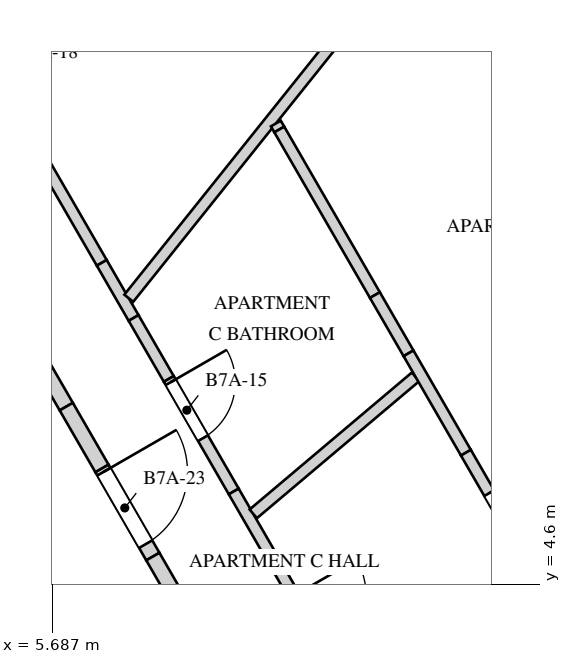
"""IFC4 building model, lengths in metres.
Left out: names, types, materials, properties, quantities, classifications, styles, units other than length and angle.
Written with IfcOpenShell. Run it as: python <this file> out.ifc"""

import sys

from ifc_helpers import new_model, si_unit, direction, frame, frame_2d, origin, place, context, subcontext, project, spatial, polyline, rectangle, outline, extrude, element, fill, save


model = new_model("IFC4")
c1 = context("Model", 3, precision=1e-05, world=origin(), true_north=direction((0.0, 1.0)))
c2 = subcontext(c1, "Body", "Model", "MODEL_VIEW")
j1 = project(units=[si_unit("LENGTHUNIT", "METRE"), si_unit("PLANEANGLEUNIT", "RADIAN")], contexts=[c1])
p1 = place(None, origin())
s1 = spatial("IfcSite", under=j1, at=p1, CompositionType="ELEMENT")
p2 = place(p1, origin())
s2 = spatial("IfcBuilding", under=s1, at=p2, CompositionType="ELEMENT")
p3 = place(p2, frame((0.0, 0.0, 274.4)))
s3 = spatial("IfcBuildingStorey", under=s2, at=p3, CompositionType="ELEMENT", Elevation=274.4)
p4 = place(p3, frame((9.902, -4.25, 0.0), z_axis=(0.0, 0.0, 1.0), x_axis=(-0.499999536116, 0.866025671608, 0.0)))
e1 = element("IfcWall", 1, at=p4, inside=s3, PredefinedType="SHEAR", context=c2, shape_type="SweptSolid", body=[
    extrude(rectangle(XDim=17.263, YDim=0.6, at=frame_2d((8.631, 0.0))), origin(), (0.0, 0.0, 1.0), 4.0),
])
p5 = place(p4, frame((6.906, 0.0, 0.0)))
e2 = element("IfcOpeningElement", 2, at=p5, cuts=e1, PredefinedType="OPENING", context=c2, shape_type="SweptSolid", body=[
    extrude(rectangle(XDim=1.0, YDim=2.4, at=frame_2d((0.5, 1.2))), frame((0.0, 0.31, 0.0), z_axis=(0.0, -1.0, 0.0), x_axis=(1.0, 0.0, 0.0)), (0.0, 0.0, 1.0), 0.62),
])
p6 = place(p3, frame((3.513, 13.715, 0.0), z_axis=(0.0, 0.0, 1.0), x_axis=(0.500019542665, -0.866014120528, 0.0)))
e3 = element("IfcWall", 3, at=p6, inside=s3, PredefinedType="PARTITIONING", context=c2, shape_type="SweptSolid", body=[
    extrude(rectangle(XDim=5.643, YDim=0.15, at=frame_2d((2.822, 0.0))), origin(), (0.0, 0.0, 1.0), 3.65),
])
p7 = place(p6, frame((2.422, 0.0, 0.0)))
e4 = element("IfcOpeningElement", 4, at=p7, cuts=e3, PredefinedType="OPENING", context=c2, shape_type="SweptSolid", body=[
    extrude(rectangle(XDim=0.95, YDim=2.4, at=frame_2d((0.475, 1.2))), frame((0.0, 0.085, 0.0), z_axis=(0.0, -1.0, 0.0), x_axis=(1.0, 0.0, 0.0)), (0.0, 0.0, 1.0), 0.17),
])
p8 = place(p3, frame((6.335, 8.828, 0.0), z_axis=(0.0, 0.0, 1.0), x_axis=(0.499932737185, -0.866064234506, 0.0)))
e5 = element("IfcWall", 5, at=p8, inside=s3, PredefinedType="PARTITIONING", context=c2, shape_type="SweptSolid", body=[
    extrude(rectangle(XDim=0.837, YDim=0.15, at=frame_2d((0.419, 0.0))), origin(), (0.0, 0.0, 1.0), 2.75),
])
p9 = place(p3, frame((6.753, 8.103, 0.0), z_axis=(0.0, 0.0, 1.0), x_axis=(0.499882215713, -0.866093395895, 0.0)))
e6 = element("IfcWall", 6, at=p9, inside=s3, PredefinedType="PARTITIONING", context=c2, shape_type="SweptSolid", body=[
    extrude(rectangle(XDim=0.926, YDim=0.15, at=frame_2d((0.463, 0.0))), origin(), (0.0, 0.0, 1.0), 3.65),
])
p10 = place(p3, frame((7.216, 7.301, 0.0), z_axis=(0.0, 0.0, 1.0), x_axis=(0.500056273262, -0.865992911964, 0.0)))
e7 = element("IfcWall", 7, at=p10, inside=s3, PredefinedType="PARTITIONING", context=c2, shape_type="SweptSolid", body=[
    extrude(outline(polyline([(0.0, 0.0), (1.709, 0.0), (1.709, 2.55), (0.825, 2.55), (0.825, 3.65), (0.0, 3.65), (0.0, 0.0)])), frame((0.0, 0.075, 0.0), z_axis=(0.0, -1.0, 0.0), x_axis=(1.0, 0.0, 0.0)), (0.0, 0.0, 1.0), 0.15),
])
p11 = place(p10, frame((0.05, 0.0, 0.0)))
e8 = element("IfcOpeningElement", 8, at=p11, cuts=e7, PredefinedType="OPENING", context=c2, shape_type="SweptSolid", body=[
    extrude(rectangle(XDim=0.85, YDim=2.4, at=frame_2d((0.425, 1.2))), frame((0.0, 0.085, 0.0), z_axis=(0.0, -1.0, 0.0), x_axis=(1.0, 0.0, 0.0)), (0.0, 0.0, 1.0), 0.17),
])
p12 = place(p3, frame((8.071, 5.821, 0.0), z_axis=(0.0, 0.0, 1.0), x_axis=(0.500071713487, -0.865983996024, 0.0)))
e9 = element("IfcWall", 9, at=p12, inside=s3, PredefinedType="PARTITIONING", context=c2, shape_type="SweptSolid", body=[
    extrude(rectangle(XDim=0.968, YDim=0.15, at=frame_2d((0.484, 0.0))), origin(), (0.0, 0.0, 1.0), 3.65),
])
p13 = place(p3, frame((8.555, 4.982, 0.0), z_axis=(0.0, 0.0, 1.0), x_axis=(0.499957874332, -0.866049723684, 0.0)))
e10 = element("IfcWall", 10, at=p13, inside=s3, PredefinedType="PARTITIONING", context=c2, shape_type="SweptSolid", body=[
    extrude(outline(polyline([(0.0, 0.0), (1.616, 0.0), (1.616, 3.65), (0.876, 3.65), (0.876, 2.55), (0.0, 2.55), (0.0, 0.0)])), frame((0.0, 0.075, 0.0), z_axis=(0.0, -1.0, 0.0), x_axis=(1.0, 0.0, 0.0)), (0.0, 0.0, 1.0), 0.15),
])
p14 = place(p13, frame((0.616, 0.0, 0.0)))
e11 = element("IfcOpeningElement", 11, at=p14, cuts=e10, PredefinedType="OPENING", context=c2, shape_type="SweptSolid", body=[
    extrude(rectangle(XDim=0.95, YDim=2.4, at=frame_2d((0.475, 1.2))), frame((0.0, 0.085, 0.0), z_axis=(0.0, -1.0, 0.0), x_axis=(1.0, 0.0, 0.0)), (0.0, 0.0, 1.0), 0.17),
])
p15 = place(p3, frame((6.69, 8.362, 0.0), z_axis=(0.0, 0.0, 1.0), x_axis=(0.624718641323, 0.780849933843, 0.0)))
e12 = element("IfcWall", 12, at=p15, inside=s3, PredefinedType="PARTITIONING", context=c2, shape_type="SweptSolid", body=[
    extrude(rectangle(XDim=8.833, YDim=0.15, at=frame_2d((4.417, 0.0))), origin(), (0.0, 0.0, 1.0), 2.75),
])
p16 = place(p3, frame((8.328, 5.526, 0.0), z_axis=(0.0, 0.0, 1.0), x_axis=(0.764108404466, 0.645087859306, 0.0)))
e13 = element("IfcWall", 13, at=p16, inside=s3, PredefinedType="PARTITIONING", context=c2, shape_type="SweptSolid", body=[
    extrude(rectangle(XDim=2.794, YDim=0.15, at=frame_2d((1.397, 0.0))), origin(), (0.0, 0.0, 1.0), 3.65),
])
p17 = place(p3, frame((8.625, 10.661, 0.0), z_axis=(0.0, 0.0, 1.0), x_axis=(0.499332966107, -0.866410173624, 0.0)))
e14 = element("IfcWall", 14, at=p17, inside=s3, PredefinedType="PARTITIONING", context=c2, shape_type="SweptSolid", body=[
    extrude(rectangle(XDim=0.09, YDim=0.15, at=frame_2d((0.045, 0.0))), origin(), (0.0, 0.0, 1.0), 2.75),
])
p18 = place(p3, frame((8.67, 10.583, 0.0), z_axis=(0.0, 0.0, 1.0), x_axis=(0.499938053331, -0.866061165757, 0.0)))
e15 = element("IfcWall", 15, at=p18, inside=s3, PredefinedType="PARTITIONING", context=c2, shape_type="SweptSolid", body=[
    extrude(rectangle(XDim=2.516, YDim=0.15, at=frame_2d((1.258, 0.0))), origin(), (0.0, 0.0, 1.0), 3.65),
])
p19 = place(p3, frame((9.928, 8.404, 0.0), z_axis=(0.0, 0.0, 1.0), x_axis=(0.500176418896, -0.865923524325, 0.0)))
e16 = element("IfcWall", 16, at=p19, inside=s3, PredefinedType="PARTITIONING", context=c2, shape_type="SweptSolid", body=[
    extrude(rectangle(XDim=0.885, YDim=0.15, at=frame_2d((0.442, 0.0))), origin(), (0.0, 0.0, 1.0), 2.55),
])
p20 = place(p3, frame((10.371, 7.638, 0.0), z_axis=(0.0, 0.0, 1.0), x_axis=(0.499983823482, -0.8660347431, 0.0)))
e17 = element("IfcWall", 17, at=p20, inside=s3, PredefinedType="PARTITIONING", context=c2, shape_type="SweptSolid", body=[
    extrude(rectangle(XDim=1.509, YDim=0.15, at=frame_2d((0.755, 0.0))), origin(), (0.0, 0.0, 1.0), 3.65),
])
p21 = place(p3, frame((11.125, 6.331, 0.0), z_axis=(0.0, 0.0, 1.0), x_axis=(0.500058405483, -0.865991680737, 0.0)))
e18 = element("IfcWall", 18, at=p21, inside=s3, PredefinedType="PARTITIONING", context=c2, shape_type="SweptSolid", body=[
    extrude(outline(polyline([(0.0, 0.0), (1.615, 0.0), (1.615, 3.65), (0.876, 3.65), (0.876, 2.55), (0.0, 2.55), (0.0, 0.0)])), frame((0.0, 0.075, 0.0), z_axis=(0.0, -1.0, 0.0), x_axis=(1.0, 0.0, 0.0)), (0.0, 0.0, 1.0), 0.15),
])
p22 = place(p21, frame((0.615, 0.0, 0.0)))
e19 = element("IfcOpeningElement", 19, at=p22, cuts=e18, PredefinedType="OPENING", context=c2, shape_type="SweptSolid", body=[
    extrude(rectangle(XDim=0.95, YDim=2.4, at=frame_2d((0.475, 1.2))), frame((0.0, 0.085, 0.0), z_axis=(0.0, -1.0, 0.0), x_axis=(1.0, 0.0, 0.0)), (0.0, 0.0, 1.0), 0.17),
])
p23 = place(p3, frame((10.007, 2.618, 0.0), z_axis=(0.0, 0.0, 1.0), x_axis=(0.967438629988, 0.253105703624, 0.0)))
e20 = element("IfcWall", 20, at=p23, inside=s3, PredefinedType="PARTITIONING", context=c2, shape_type="SweptSolid", body=[
    extrude(rectangle(XDim=9.199, YDim=0.15, at=frame_2d((4.6, 0.0))), origin(), (0.0, 0.0, 1.0), 2.75),
])
p24 = place(p3, frame((5.436, 7.686, 0.0), z_axis=(0.0, 0.0, 1.0), x_axis=(0.500056482814, -0.86599279096, 0.0)))
e21 = element("IfcWall", 21, at=p24, inside=s3, PredefinedType="SOLIDWALL", context=c2, shape_type="SweptSolid", body=[
    extrude(rectangle(XDim=0.865, YDim=0.2, at=frame_2d((0.432, 0.0))), origin(), (0.0, 0.0, 1.0), 2.75),
])
p25 = place(p3, frame((5.868, 6.937, 0.0), z_axis=(0.0, 0.0, 1.0), x_axis=(0.499857464265, -0.866107681191, 0.0)))
e22 = element("IfcWall", 22, at=p25, inside=s3, PredefinedType="SOLIDWALL", context=c2, shape_type="SweptSolid", body=[
    extrude(rectangle(XDim=0.939, YDim=0.2, at=frame_2d((0.47, 0.0))), origin(), (0.0, 0.0, 1.0), 3.65),
])
p26 = place(p3, frame((6.337, 6.123, 0.0), z_axis=(0.0, 0.0, 1.0), x_axis=(0.499943416353, -0.866058069904, 0.0)))
e23 = element("IfcWall", 23, at=p26, inside=s3, PredefinedType="SOLIDWALL", context=c2, shape_type="SweptSolid", body=[
    extrude(outline(polyline([(0.0, 0.0), (1.339, 0.0), (1.339, 2.55), (0.429, 2.55), (0.429, 3.65), (0.0, 3.65), (0.0, 0.0)])), frame((0.0, 0.1, 0.0), z_axis=(0.0, -1.0, 0.0), x_axis=(1.0, 0.0, 0.0)), (0.0, 0.0, 1.0), 0.2),
])
p27 = place(p26, frame((0.05, 0.0, 0.0)))
e24 = element("IfcOpeningElement", 24, at=p27, cuts=e23, PredefinedType="OPENING", context=c2, shape_type="SweptSolid", body=[
    extrude(rectangle(XDim=1.1, YDim=2.4, at=frame_2d((0.55, 1.2))), frame((0.0, 0.11, 0.0), z_axis=(0.0, -1.0, 0.0), x_axis=(1.0, 0.0, 0.0)), (0.0, 0.0, 1.0), 0.22),
])
p28 = place(p3, frame((7.007, 4.964, 0.0), z_axis=(0.0, 0.0, 1.0), x_axis=(0.499977339252, -0.866038486578, 0.0)))
e25 = element("IfcWall", 25, at=p28, inside=s3, PredefinedType="SOLIDWALL", context=c2, shape_type="SweptSolid", body=[
    extrude(rectangle(XDim=0.691, YDim=0.2, at=frame_2d((0.345, 0.0))), origin(), (0.0, 0.0, 1.0), 3.65),
])
p29 = place(p11, origin())
e26 = element("IfcDoor", 26, at=p29, inside=s3, OperationType="SINGLE_SWING_LEFT", PredefinedType="DOOR", context=c2, shape_type="SweptSolid", body=[
    extrude(rectangle(XDim=0.85, YDim=2.4, at=frame_2d((0.425, 1.2))), frame((0.0, 0.025, 0.0), z_axis=(0.0, -1.0, 0.0), x_axis=(1.0, 0.0, 0.0)), (0.0, 0.0, 1.0), 0.05),
])
fill(e8, e26)
p30 = place(p22, origin())
e27 = element("IfcDoor", 27, at=p30, inside=s3, OperationType="SINGLE_SWING_RIGHT", PredefinedType="DOOR", context=c2, shape_type="SweptSolid", body=[
    extrude(rectangle(XDim=0.95, YDim=2.4, at=frame_2d((0.475, 1.2))), frame((0.0, 0.025, 0.0), z_axis=(0.0, -1.0, 0.0), x_axis=(1.0, 0.0, 0.0)), (0.0, 0.0, 1.0), 0.05),
])
fill(e19, e27)
p31 = place(p27, origin())
e28 = element("IfcDoor", 28, at=p31, inside=s3, OperationType="SINGLE_SWING_LEFT", PredefinedType="DOOR", context=c2, shape_type="SweptSolid", body=[
    extrude(rectangle(XDim=1.1, YDim=2.4, at=frame_2d((0.55, 1.2))), frame((0.0, 0.025, 0.0), z_axis=(0.0, -1.0, 0.0), x_axis=(1.0, 0.0, 0.0)), (0.0, 0.0, 1.0), 0.05),
])
fill(e24, e28)
save(model, sys.argv[1])
